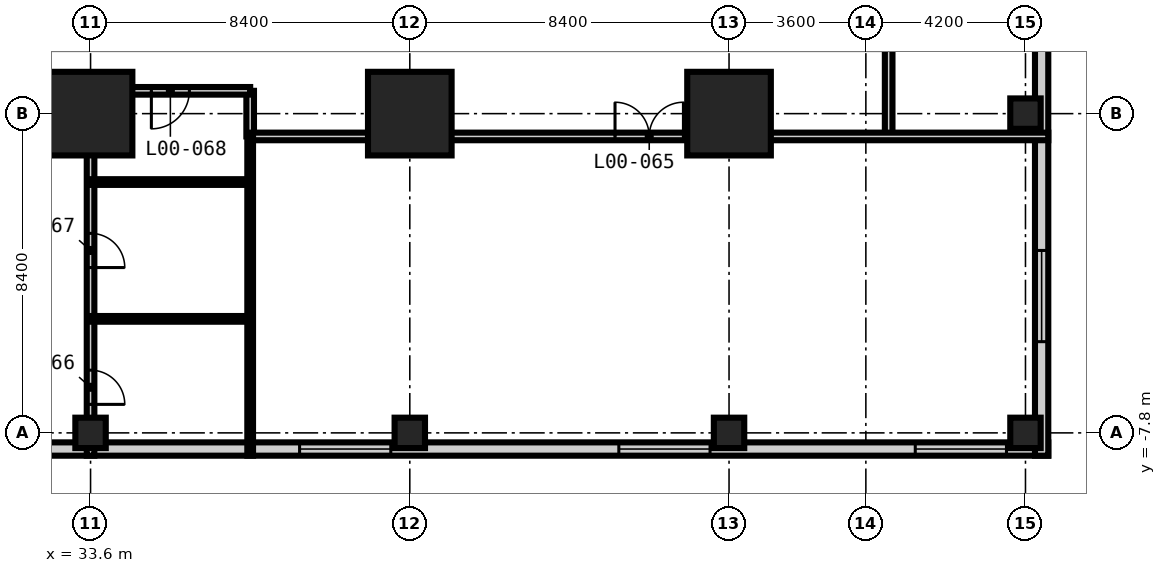
"""IFC4 building model, lengths in metres.
Left out: names, types, materials, properties, quantities, classifications, styles, units other than length and angle.
Written with IfcOpenShell. Run it as: python <this file> out.ifc"""

import sys

from ifc_helpers import new_model, si_unit, direction, frame, frame_2d, origin, origin_2d, place, context, subcontext, project, spatial, rectangle, extrude, element, fill, save


model = new_model("IFC4")
c1 = context("Model", 3, precision=1e-05, world=origin(), true_north=direction((0.0, 1.0)))
c2 = subcontext(c1, "Body", "Model", "MODEL_VIEW")
j1 = project(units=[si_unit("LENGTHUNIT", "METRE"), si_unit("PLANEANGLEUNIT", "RADIAN")], contexts=[c1])
p1 = place(None, origin())
s1 = spatial("IfcSite", under=j1, at=p1, CompositionType="ELEMENT")
p2 = place(p1, origin())
s2 = spatial("IfcBuilding", under=s1, at=p2, CompositionType="ELEMENT")
p3 = place(p2, origin())
s3 = spatial("IfcBuildingStorey", under=s2, at=p3, CompositionType="ELEMENT", Elevation=0.0)
for number, where, z_axis, x_axis in (
    (1, (33.6, 0.6, -0.3), (0.0, 0.0, 1.0), (1.0, 0.0, 0.0)),
    (2, (42.0, 0.6, -0.3), (0.0, 0.0, 1.0), (1.0, 0.0, 0.0)),
    (3, (50.4, 0.6, -0.3), (0.0, 0.0, 1.0), (1.0, 0.0, 0.0)),
):
    element("IfcColumn", number, at=place(p3, frame(where, z_axis=z_axis, x_axis=x_axis)), inside=s3, PredefinedType="COLUMN", context=c2, shape_type="SweptSolid", body=[
        extrude(rectangle(XDim=2.2, YDim=2.2, at=origin_2d()), origin(), (0.0, 0.0, 1.0), 6.0),
    ])
for number, where, z_axis, x_axis in (
    (4, (33.6, -7.8, -0.3), (0.0, 0.0, 1.0), (1.0, 0.0, 0.0)),
    (5, (42.0, -7.8, -0.3), (0.0, 0.0, 1.0), (1.0, 0.0, 0.0)),
    (6, (50.4, -7.8, -0.3), (0.0, 0.0, 1.0), (1.0, 0.0, 0.0)),
    (7, (58.2, -7.8, -0.3), (0.0, 0.0, 1.0), (1.0, 0.0, 0.0)),
    (8, (58.2, 0.6, -0.3), (0.0, 0.0, 1.0), (1.0, 0.0, 0.0)),
):
    element("IfcColumn", number, at=place(p3, frame(where, z_axis=z_axis, x_axis=x_axis)), inside=s3, PredefinedType="COLUMN", context=c2, shape_type="SweptSolid", body=[
        extrude(rectangle(XDim=0.8, YDim=0.8, at=origin_2d()), origin(), (0.0, 0.0, 1.0), 6.0),
    ])
p4 = place(p3, frame((-33.6, -8.225, 0.0), z_axis=(0.0, 0.0, 1.0), x_axis=(1.0, 0.0, 0.0)))
e9 = element("IfcWall", 9, at=p4, inside=s3, PredefinedType="SOLIDWALL", context=c2, shape_type="SweptSolid", body=[
    extrude(rectangle(XDim=92.4, YDim=0.35, at=frame_2d((46.2, 0.0))), origin(), (0.0, 0.0, 1.0), 5.7),
])
p5 = place(p4, frame((5.4, 0.0, 0.0)))
e10 = element("IfcOpeningElement", 10, at=p5, cuts=e9, PredefinedType="OPENING", context=c2, shape_type="SweptSolid", body=[
    extrude(rectangle(XDim=1.8, YDim=2.7, at=frame_2d((0.9, 1.35))), frame((0.0, 0.185, 0.0), z_axis=(0.0, -1.0, 0.0), x_axis=(1.0, 0.0, 0.0)), (0.0, 0.0, 1.0), 0.37),
])
p6 = place(p4, frame((2.8, 0.0, 0.9)))
e11 = element("IfcOpeningElement", 11, at=p6, cuts=e9, PredefinedType="OPENING", context=c2, shape_type="SweptSolid", body=[
    extrude(rectangle(XDim=2.4, YDim=2.4, at=frame_2d((1.2, 1.2))), frame((0.0, 0.185, 0.0), z_axis=(0.0, -1.0, 0.0), x_axis=(1.0, 0.0, 0.0)), (0.0, 0.0, 1.0), 0.37),
])
p7 = place(p4, frame((9.3, 0.0, 0.9)))
e12 = element("IfcOpeningElement", 12, at=p7, cuts=e9, PredefinedType="OPENING", context=c2, shape_type="SweptSolid", body=[
    extrude(rectangle(XDim=2.4, YDim=2.4, at=frame_2d((1.2, 1.2))), frame((0.0, 0.185, 0.0), z_axis=(0.0, -1.0, 0.0), x_axis=(1.0, 0.0, 0.0)), (0.0, 0.0, 1.0), 0.37),
])
p8 = place(p4, frame((13.8, 0.0, 0.9)))
e13 = element("IfcOpeningElement", 13, at=p8, cuts=e9, PredefinedType="OPENING", context=c2, shape_type="SweptSolid", body=[
    extrude(rectangle(XDim=2.4, YDim=2.4, at=frame_2d((1.2, 1.2))), frame((0.0, 0.185, 0.0), z_axis=(0.0, -1.0, 0.0), x_axis=(1.0, 0.0, 0.0)), (0.0, 0.0, 1.0), 0.37),
])
p9 = place(p4, frame((19.3, 0.0, 0.0)))
e14 = element("IfcOpeningElement", 14, at=p9, cuts=e9, PredefinedType="OPENING", context=c2, shape_type="SweptSolid", body=[
    extrude(rectangle(XDim=1.2, YDim=2.4, at=frame_2d((0.6, 1.2))), frame((0.0, 0.185, 0.0), z_axis=(0.0, -1.0, 0.0), x_axis=(1.0, 0.0, 0.0)), (0.0, 0.0, 1.0), 0.37),
])
p10 = place(p4, frame((26.8, 0.0, 0.0)))
e15 = element("IfcOpeningElement", 15, at=p10, cuts=e9, PredefinedType="OPENING", context=c2, shape_type="SweptSolid", body=[
    extrude(rectangle(XDim=2.4, YDim=3.0, at=frame_2d((1.2, 1.5))), frame((0.0, 0.185, 0.0), z_axis=(0.0, -1.0, 0.0), x_axis=(1.0, 0.0, 0.0)), (0.0, 0.0, 1.0), 0.37),
])
p11 = place(p4, frame((36.9, 0.0, 0.0)))
e16 = element("IfcOpeningElement", 16, at=p11, cuts=e9, PredefinedType="OPENING", context=c2, shape_type="SweptSolid", body=[
    extrude(rectangle(XDim=1.8, YDim=2.4, at=frame_2d((0.9, 1.2))), frame((0.0, 0.185, 0.0), z_axis=(0.0, -1.0, 0.0), x_axis=(1.0, 0.0, 0.0)), (0.0, 0.0, 1.0), 0.37),
])
p12 = place(p4, frame((38.9, 0.0, 0.9)))
e17 = element("IfcOpeningElement", 17, at=p12, cuts=e9, PredefinedType="OPENING", context=c2, shape_type="SweptSolid", body=[
    extrude(rectangle(XDim=2.4, YDim=2.4, at=frame_2d((1.2, 1.2))), frame((0.0, 0.185, 0.0), z_axis=(0.0, -1.0, 0.0), x_axis=(1.0, 0.0, 0.0)), (0.0, 0.0, 1.0), 0.37),
])
p13 = place(p4, frame((53.7, 0.0, 0.0)))
e18 = element("IfcOpeningElement", 18, at=p13, cuts=e9, PredefinedType="OPENING", context=c2, shape_type="SweptSolid", body=[
    extrude(rectangle(XDim=1.8, YDim=2.4, at=frame_2d((0.9, 1.2))), frame((0.0, 0.185, 0.0), z_axis=(0.0, -1.0, 0.0), x_axis=(1.0, 0.0, 0.0)), (0.0, 0.0, 1.0), 0.37),
])
p14 = place(p4, frame((51.1, 0.0, 0.9)))
e19 = element("IfcOpeningElement", 19, at=p14, cuts=e9, PredefinedType="OPENING", context=c2, shape_type="SweptSolid", body=[
    extrude(rectangle(XDim=2.4, YDim=2.4, at=frame_2d((1.2, 1.2))), frame((0.0, 0.185, 0.0), z_axis=(0.0, -1.0, 0.0), x_axis=(1.0, 0.0, 0.0)), (0.0, 0.0, 1.0), 0.37),
])
p15 = place(p4, frame((61.8, 0.0, 0.0)))
e20 = element("IfcOpeningElement", 20, at=p15, cuts=e9, PredefinedType="OPENING", context=c2, shape_type="SweptSolid", body=[
    extrude(rectangle(XDim=2.4, YDim=3.0, at=frame_2d((1.2, 1.5))), frame((0.0, 0.185, 0.0), z_axis=(0.0, -1.0, 0.0), x_axis=(1.0, 0.0, 0.0)), (0.0, 0.0, 1.0), 0.37),
])
p16 = place(p4, frame((72.7, 0.0, 0.9)))
e21 = element("IfcOpeningElement", 21, at=p16, cuts=e9, PredefinedType="OPENING", context=c2, shape_type="SweptSolid", body=[
    extrude(rectangle(XDim=2.4, YDim=2.4, at=frame_2d((1.2, 1.2))), frame((0.0, 0.185, 0.0), z_axis=(0.0, -1.0, 0.0), x_axis=(1.0, 0.0, 0.0)), (0.0, 0.0, 1.0), 0.37),
])
p17 = place(p4, frame((81.1, 0.0, 0.9)))
e22 = element("IfcOpeningElement", 22, at=p17, cuts=e9, PredefinedType="OPENING", context=c2, shape_type="SweptSolid", body=[
    extrude(rectangle(XDim=2.4, YDim=2.4, at=frame_2d((1.2, 1.2))), frame((0.0, 0.185, 0.0), z_axis=(0.0, -1.0, 0.0), x_axis=(1.0, 0.0, 0.0)), (0.0, 0.0, 1.0), 0.37),
])
p18 = place(p4, frame((88.9, 0.0, 0.9)))
e23 = element("IfcOpeningElement", 23, at=p18, cuts=e9, PredefinedType="OPENING", context=c2, shape_type="SweptSolid", body=[
    extrude(rectangle(XDim=2.4, YDim=2.4, at=frame_2d((1.2, 1.2))), frame((0.0, 0.185, 0.0), z_axis=(0.0, -1.0, 0.0), x_axis=(1.0, 0.0, 0.0)), (0.0, 0.0, 1.0), 0.37),
])
p19 = place(p3, frame((58.625, -8.4, 0.0), z_axis=(0.0, 0.0, 1.0), x_axis=(0.0, 1.0, 0.0)))
e24 = element("IfcWall", 24, at=p19, inside=s3, PredefinedType="SOLIDWALL", context=c2, shape_type="SweptSolid", body=[
    extrude(rectangle(XDim=67.2, YDim=0.35, at=frame_2d((33.6, 0.0))), origin(), (0.0, 0.0, 1.0), 5.7),
])
p20 = place(p19, frame((3.0, 0.0, 0.9)))
e25 = element("IfcOpeningElement", 25, at=p20, cuts=e24, PredefinedType="OPENING", context=c2, shape_type="SweptSolid", body=[
    extrude(rectangle(XDim=2.4, YDim=2.4, at=frame_2d((1.2, 1.2))), frame((0.0, 0.185, 0.0), z_axis=(0.0, -1.0, 0.0), x_axis=(1.0, 0.0, 0.0)), (0.0, 0.0, 1.0), 0.37),
])
p21 = place(p19, frame((18.1, 0.0, 0.0)))
e26 = element("IfcOpeningElement", 26, at=p21, cuts=e24, PredefinedType="OPENING", context=c2, shape_type="SweptSolid", body=[
    extrude(rectangle(XDim=2.4, YDim=3.0, at=frame_2d((1.2, 1.5))), frame((0.0, 0.185, 0.0), z_axis=(0.0, -1.0, 0.0), x_axis=(1.0, 0.0, 0.0)), (0.0, 0.0, 1.0), 0.37),
])
p22 = place(p19, frame((11.4, 0.0, 0.9)))
e27 = element("IfcOpeningElement", 27, at=p22, cuts=e24, PredefinedType="OPENING", context=c2, shape_type="SweptSolid", body=[
    extrude(rectangle(XDim=2.4, YDim=2.4, at=frame_2d((1.2, 1.2))), frame((0.0, 0.185, 0.0), z_axis=(0.0, -1.0, 0.0), x_axis=(1.0, 0.0, 0.0)), (0.0, 0.0, 1.0), 0.37),
])
p23 = place(p19, frame((20.7, 0.0, 0.9)))
e28 = element("IfcOpeningElement", 28, at=p23, cuts=e24, PredefinedType="OPENING", context=c2, shape_type="SweptSolid", body=[
    extrude(rectangle(XDim=2.4, YDim=2.4, at=frame_2d((1.2, 1.2))), frame((0.0, 0.185, 0.0), z_axis=(0.0, -1.0, 0.0), x_axis=(1.0, 0.0, 0.0)), (0.0, 0.0, 1.0), 0.37),
])
p24 = place(p19, frame((28.2, 0.0, 0.9)))
e29 = element("IfcOpeningElement", 29, at=p24, cuts=e24, PredefinedType="OPENING", context=c2, shape_type="SweptSolid", body=[
    extrude(rectangle(XDim=2.4, YDim=2.4, at=frame_2d((1.2, 1.2))), frame((0.0, 0.185, 0.0), z_axis=(0.0, -1.0, 0.0), x_axis=(1.0, 0.0, 0.0)), (0.0, 0.0, 1.0), 0.37),
])
p25 = place(p19, frame((36.6, 0.0, 0.9)))
e30 = element("IfcOpeningElement", 30, at=p25, cuts=e24, PredefinedType="OPENING", context=c2, shape_type="SweptSolid", body=[
    extrude(rectangle(XDim=2.4, YDim=2.4, at=frame_2d((1.2, 1.2))), frame((0.0, 0.185, 0.0), z_axis=(0.0, -1.0, 0.0), x_axis=(1.0, 0.0, 0.0)), (0.0, 0.0, 1.0), 0.37),
])
p26 = place(p19, frame((45.0, 0.0, 0.9)))
e31 = element("IfcOpeningElement", 31, at=p26, cuts=e24, PredefinedType="OPENING", context=c2, shape_type="SweptSolid", body=[
    extrude(rectangle(XDim=2.4, YDim=2.4, at=frame_2d((1.2, 1.2))), frame((0.0, 0.185, 0.0), z_axis=(0.0, -1.0, 0.0), x_axis=(1.0, 0.0, 0.0)), (0.0, 0.0, 1.0), 0.37),
])
p27 = place(p19, frame((60.1, 0.0, 0.0)))
e32 = element("IfcOpeningElement", 32, at=p27, cuts=e24, PredefinedType="OPENING", context=c2, shape_type="SweptSolid", body=[
    extrude(rectangle(XDim=3.6, YDim=4.5, at=frame_2d((1.8, 2.25))), frame((0.0, 0.185, 0.0), z_axis=(0.0, -1.0, 0.0), x_axis=(1.0, 0.0, 0.0)), (0.0, 0.0, 1.0), 0.37),
])
p28 = place(p19, frame((53.4, 0.0, 0.9)))
e33 = element("IfcOpeningElement", 33, at=p28, cuts=e24, PredefinedType="OPENING", context=c2, shape_type="SweptSolid", body=[
    extrude(rectangle(XDim=2.4, YDim=2.4, at=frame_2d((1.2, 1.2))), frame((0.0, 0.185, 0.0), z_axis=(0.0, -1.0, 0.0), x_axis=(1.0, 0.0, 0.0)), (0.0, 0.0, 1.0), 0.37),
])
p29 = place(p3, frame((33.6, -8.4, 0.0), z_axis=(0.0, 0.0, 1.0), x_axis=(0.0, 1.0, 0.0)))
e34 = element("IfcWall", 34, at=p29, inside=s3, PredefinedType="PARTITIONING", context=c2, shape_type="SweptSolid", body=[
    extrude(rectangle(XDim=9.6, YDim=0.2, at=frame_2d((4.8, 0.0))), origin(), (0.0, 0.0, 1.0), 5.7),
])
p30 = place(p29, frame((1.35, 0.0, 0.0)))
e35 = element("IfcOpeningElement", 35, at=p30, cuts=e34, PredefinedType="OPENING", context=c2, shape_type="SweptSolid", body=[
    extrude(rectangle(XDim=0.9, YDim=2.1, at=frame_2d((0.45, 1.05))), frame((0.0, 0.11, 0.0), z_axis=(0.0, -1.0, 0.0), x_axis=(1.0, 0.0, 0.0)), (0.0, 0.0, 1.0), 0.22),
])
p31 = place(p29, frame((4.95, 0.0, 0.0)))
e36 = element("IfcOpeningElement", 36, at=p31, cuts=e34, PredefinedType="OPENING", context=c2, shape_type="SweptSolid", body=[
    extrude(rectangle(XDim=0.9, YDim=2.1, at=frame_2d((0.45, 1.05))), frame((0.0, 0.11, 0.0), z_axis=(0.0, -1.0, 0.0), x_axis=(1.0, 0.0, 0.0)), (0.0, 0.0, 1.0), 0.22),
])
p32 = place(p3, frame((37.8, 0.0, 0.0), z_axis=(0.0, 0.0, 1.0), x_axis=(0.0, 1.0, 0.0)))
e37 = element("IfcWall", 37, at=p32, inside=s3, PredefinedType="PARTITIONING", context=c2, shape_type="SweptSolid", body=[
    extrude(rectangle(XDim=1.2, YDim=0.2, at=frame_2d((0.6, 0.0))), origin(), (0.0, 0.0, 1.0), 5.7),
])
p33 = place(p3, frame((54.6, 0.0, 0.0), z_axis=(0.0, 0.0, 1.0), x_axis=(0.0, 1.0, 0.0)))
e38 = element("IfcWall", 38, at=p33, inside=s3, PredefinedType="PARTITIONING", context=c2, shape_type="SweptSolid", body=[
    extrude(rectangle(XDim=16.8, YDim=0.2, at=frame_2d((8.4, 0.0))), origin(), (0.0, 0.0, 1.0), 5.7),
])
p34 = place(p33, frame((13.8, 0.0, 0.0)))
e39 = element("IfcOpeningElement", 39, at=p34, cuts=e38, PredefinedType="OPENING", context=c2, shape_type="SweptSolid", body=[
    extrude(rectangle(XDim=1.8, YDim=2.4, at=frame_2d((0.9, 1.2))), frame((0.0, 0.11, 0.0), z_axis=(0.0, -1.0, 0.0), x_axis=(1.0, 0.0, 0.0)), (0.0, 0.0, 1.0), 0.22),
])
p35 = place(p33, frame((5.4, 0.0, 0.0)))
e40 = element("IfcOpeningElement", 40, at=p35, cuts=e38, PredefinedType="OPENING", context=c2, shape_type="SweptSolid", body=[
    extrude(rectangle(XDim=1.8, YDim=2.4, at=frame_2d((0.9, 1.2))), frame((0.0, 0.11, 0.0), z_axis=(0.0, -1.0, 0.0), x_axis=(1.0, 0.0, 0.0)), (0.0, 0.0, 1.0), 0.22),
])
p36 = place(p3, frame((37.8, 0.0, 0.0), z_axis=(0.0, 0.0, 1.0), x_axis=(1.0, 0.0, 0.0)))
e41 = element("IfcWall", 41, at=p36, inside=s3, PredefinedType="PARTITIONING", context=c2, shape_type="SweptSolid", body=[
    extrude(rectangle(XDim=21.0, YDim=0.2, at=frame_2d((10.5, 0.0))), origin(), (0.0, 0.0, 1.0), 5.7),
])
p37 = place(p36, frame((9.6, 0.0, 0.0)))
e42 = element("IfcOpeningElement", 42, at=p37, cuts=e41, PredefinedType="OPENING", context=c2, shape_type="SweptSolid", body=[
    extrude(rectangle(XDim=1.8, YDim=2.4, at=frame_2d((0.9, 1.2))), frame((0.0, 0.11, 0.0), z_axis=(0.0, -1.0, 0.0), x_axis=(1.0, 0.0, 0.0)), (0.0, 0.0, 1.0), 0.22),
])
p38 = place(p3, frame((33.6, 1.2, 0.0), z_axis=(0.0, 0.0, 1.0), x_axis=(1.0, 0.0, 0.0)))
e43 = element("IfcWall", 43, at=p38, inside=s3, PredefinedType="PARTITIONING", context=c2, shape_type="SweptSolid", body=[
    extrude(rectangle(XDim=4.2, YDim=0.2, at=frame_2d((2.1, 0.0))), origin(), (0.0, 0.0, 1.0), 5.7),
])
p39 = place(p38, frame((1.6, 0.0, 0.0)))
e44 = element("IfcOpeningElement", 44, at=p39, cuts=e43, PredefinedType="OPENING", context=c2, shape_type="SweptSolid", body=[
    extrude(rectangle(XDim=1.0, YDim=2.1, at=frame_2d((0.5, 1.05))), frame((0.0, 0.11, 0.0), z_axis=(0.0, -1.0, 0.0), x_axis=(1.0, 0.0, 0.0)), (0.0, 0.0, 1.0), 0.22),
])
p40 = place(p3, frame((37.8, -8.4, 0.0), z_axis=(0.0, 0.0, 1.0), x_axis=(0.0, 1.0, 0.0)))
e45 = element("IfcWall", 45, at=p40, inside=s3, PredefinedType="PARTITIONING", context=c2, shape_type="SweptSolid", body=[
    extrude(rectangle(XDim=8.4, YDim=0.15, at=frame_2d((4.2, 0.0))), origin(), (0.0, 0.0, 1.0), 5.7),
])
for number, where, z_axis, x_axis in (
    (46, (33.6, -4.8, 0.0), (0.0, 0.0, 1.0), (1.0, 0.0, 0.0)),
    (47, (33.6, -1.2, 0.0), (0.0, 0.0, 1.0), (1.0, 0.0, 0.0)),
):
    element("IfcWall", number, at=place(p3, frame(where, z_axis=z_axis, x_axis=x_axis)), inside=s3, PredefinedType="PARTITIONING", context=c2, shape_type="SweptSolid", body=[
        extrude(rectangle(XDim=4.2, YDim=0.15, at=frame_2d((2.1, 0.0))), origin(), (0.0, 0.0, 1.0), 5.7),
    ])
p41 = place(p16, origin())
e48 = element("IfcWindow", 48, at=p41, inside=s3, PartitioningType="SINGLE_PANEL", PredefinedType="WINDOW", context=c2, shape_type="SweptSolid", body=[
    extrude(rectangle(XDim=2.4, YDim=2.4, at=frame_2d((1.2, 1.2))), frame((0.0, 0.03, 0.0), z_axis=(0.0, -1.0, 0.0), x_axis=(1.0, 0.0, 0.0)), (0.0, 0.0, 1.0), 0.06),
])
fill(e21, e48)
p42 = place(p17, origin())
e49 = element("IfcWindow", 49, at=p42, inside=s3, PartitioningType="SINGLE_PANEL", PredefinedType="WINDOW", context=c2, shape_type="SweptSolid", body=[
    extrude(rectangle(XDim=2.4, YDim=2.4, at=frame_2d((1.2, 1.2))), frame((0.0, 0.03, 0.0), z_axis=(0.0, -1.0, 0.0), x_axis=(1.0, 0.0, 0.0)), (0.0, 0.0, 1.0), 0.06),
])
fill(e22, e49)
p43 = place(p18, origin())
e50 = element("IfcWindow", 50, at=p43, inside=s3, PartitioningType="SINGLE_PANEL", PredefinedType="WINDOW", context=c2, shape_type="SweptSolid", body=[
    extrude(rectangle(XDim=2.4, YDim=2.4, at=frame_2d((1.2, 1.2))), frame((0.0, 0.03, 0.0), z_axis=(0.0, -1.0, 0.0), x_axis=(1.0, 0.0, 0.0)), (0.0, 0.0, 1.0), 0.06),
])
fill(e23, e50)
p44 = place(p20, origin())
e51 = element("IfcWindow", 51, at=p44, inside=s3, PartitioningType="SINGLE_PANEL", PredefinedType="WINDOW", context=c2, shape_type="SweptSolid", body=[
    extrude(rectangle(XDim=2.4, YDim=2.4, at=frame_2d((1.2, 1.2))), frame((0.0, 0.03, 0.0), z_axis=(0.0, -1.0, 0.0), x_axis=(1.0, 0.0, 0.0)), (0.0, 0.0, 1.0), 0.06),
])
fill(e25, e51)
p45 = place(p37, origin())
e52 = element("IfcDoor", 52, at=p45, inside=s3, OperationType="DOUBLE_DOOR_DOUBLE_SWING", PredefinedType="DOOR", context=c2, shape_type="SweptSolid", body=[
    extrude(rectangle(XDim=1.8, YDim=2.4, at=frame_2d((0.9, 1.2))), frame((0.0, 0.025, 0.0), z_axis=(0.0, -1.0, 0.0), x_axis=(1.0, 0.0, 0.0)), (0.0, 0.0, 1.0), 0.05),
])
fill(e42, e52)
p46 = place(p30, frame((0.9, 0.0, 0.0), z_axis=(0.0, 0.0, 1.0), x_axis=(-1.0, 0.0, 0.0)))
e53 = element("IfcDoor", 53, at=p46, inside=s3, OperationType="SINGLE_SWING_RIGHT", PredefinedType="DOOR", context=c2, shape_type="SweptSolid", body=[
    extrude(rectangle(XDim=0.9, YDim=2.1, at=frame_2d((0.45, 1.05))), frame((0.0, 0.025, 0.0), z_axis=(0.0, -1.0, 0.0), x_axis=(1.0, 0.0, 0.0)), (0.0, 0.0, 1.0), 0.05),
])
fill(e35, e53)
p47 = place(p31, frame((0.9, 0.0, 0.0), z_axis=(0.0, 0.0, 1.0), x_axis=(-1.0, 0.0, 0.0)))
e54 = element("IfcDoor", 54, at=p47, inside=s3, OperationType="SINGLE_SWING_RIGHT", PredefinedType="DOOR", context=c2, shape_type="SweptSolid", body=[
    extrude(rectangle(XDim=0.9, YDim=2.1, at=frame_2d((0.45, 1.05))), frame((0.0, 0.025, 0.0), z_axis=(0.0, -1.0, 0.0), x_axis=(1.0, 0.0, 0.0)), (0.0, 0.0, 1.0), 0.05),
])
fill(e36, e54)
p48 = place(p39, frame((1.0, 0.0, 0.0), z_axis=(0.0, 0.0, 1.0), x_axis=(-1.0, 0.0, 0.0)))
e55 = element("IfcDoor", 55, at=p48, inside=s3, OperationType="SINGLE_SWING_RIGHT", PredefinedType="DOOR", context=c2, shape_type="SweptSolid", body=[
    extrude(rectangle(XDim=1.0, YDim=2.1, at=frame_2d((0.5, 1.05))), frame((0.0, 0.025, 0.0), z_axis=(0.0, -1.0, 0.0), x_axis=(1.0, 0.0, 0.0)), (0.0, 0.0, 1.0), 0.05),
])
fill(e44, e55)
save(model, sys.argv[1])
